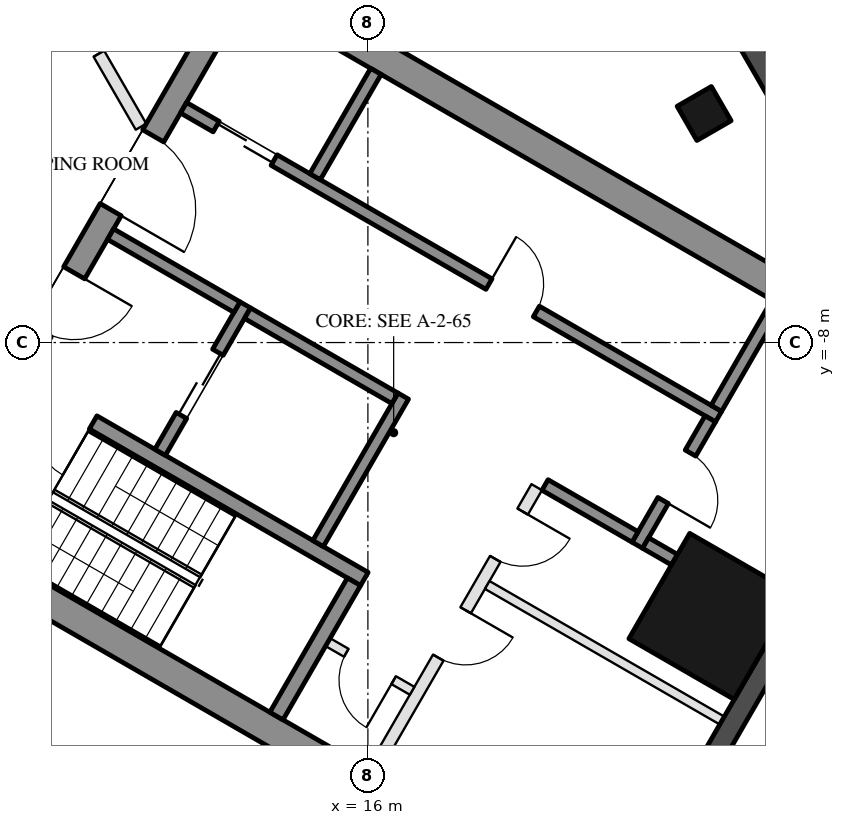
"""IFC4 building model, lengths in metres.
Left out: names, types, materials, properties, quantities, classifications, styles, units other than length and angle.
Written with IfcOpenShell. Run it as: python <this file> out.ifc"""

import sys

from ifc_helpers import new_model, si_unit, direction, frame, frame_2d, origin, origin_2d, place, context, subcontext, project, spatial, rectangle, hollow_rectangle, extrude, boolean, halfspace, element, fill, save


model = new_model("IFC4")
c1 = context("Model", 3, precision=1e-05, world=origin(), true_north=direction((0.0, 1.0)))
c2 = subcontext(c1, "Body", "Model", "MODEL_VIEW")
j1 = project(units=[si_unit("LENGTHUNIT", "METRE"), si_unit("PLANEANGLEUNIT", "RADIAN")], contexts=[c1])
p1 = place(None, origin())
s1 = spatial("IfcSite", under=j1, at=p1, CompositionType="ELEMENT")
p2 = place(p1, origin())
s2 = spatial("IfcBuilding", under=s1, at=p2, CompositionType="ELEMENT")
p3 = place(p2, frame((0.0, 0.0, 280.0)))
s3 = spatial("IfcBuildingStorey", under=s2, at=p3, CompositionType="ELEMENT", Elevation=280.0)
p4 = place(p3, frame((21.53, -4.233, 0.0), z_axis=(0.0, 0.0, 1.0), x_axis=(-0.5, 0.866025403784, 0.0)))
e1 = element("IfcColumn", 1, at=p4, inside=s3, PredefinedType="COLUMN", context=c2, shape_type="SweptSolid", body=[
    boolean("DIFFERENCE", extrude(hollow_rectangle(XDim=0.65, YDim=0.65, WallThickness=0.03, at=origin_2d()), origin(), (0.0, 0.0, 1.0), 3.7), halfspace(frame((0.0, 0.0, 0.047), z_axis=(0.0, 0.0, 1.0), x_axis=(1.0, 0.0, 0.0)), True)),
])
p5 = place(p3, frame((21.658, -12.504, 0.0), z_axis=(0.0, 0.0, 1.0), x_axis=(0.5, 0.866025403784, 0.0)))
e2 = element("IfcColumn", 2, at=p5, inside=s3, PredefinedType="COLUMN", context=c2, shape_type="SweptSolid", body=[
    boolean("DIFFERENCE", extrude(hollow_rectangle(XDim=2.0, YDim=2.0, WallThickness=0.05, at=origin_2d()), origin(), (0.0, 0.0, 1.0), 3.7), halfspace(frame((0.0, 0.0, 0.113), z_axis=(0.0, 0.0, 1.0), x_axis=(1.0, 0.0, 0.0)), True)),
])
p6 = place(p3, frame((21.384, -15.33, 0.0), z_axis=(0.0, 0.0, 1.0), x_axis=(0.500020983425, 0.866013288659, 0.0)))
e3 = element("IfcWall", 3, at=p6, inside=s3, PredefinedType="SOLIDWALL", context=c2, shape_type="SweptSolid", body=[
    extrude(rectangle(XDim=5.168, YDim=0.35, at=frame_2d((2.584, 0.0))), origin(), (0.0, 0.0, 1.0), 3.55),
])
p7 = place(p3, frame((23.968, -6.006, 0.0), z_axis=(0.0, 0.0, 1.0), x_axis=(-0.500008899612, 0.86602026553, 0.0)))
e4 = element("IfcWall", 4, at=p7, inside=s3, PredefinedType="SOLIDWALL", context=c2, shape_type="SweptSolid", body=[
    extrude(rectangle(XDim=10.87, YDim=0.35, at=frame_2d((5.435, 0.0))), origin(), (0.0, 0.0, 1.0), 3.55),
])
p8 = place(p7, frame((6.894, 0.0, 0.0)))
e5 = element("IfcOpeningElement", 5, at=p8, cuts=e4, PredefinedType="OPENING", context=c2, shape_type="SweptSolid", body=[
    extrude(rectangle(XDim=2.4, YDim=2.4, at=frame_2d((1.2, 1.2))), frame((0.0, 0.185, 0.0), z_axis=(0.0, -1.0, 0.0), x_axis=(1.0, 0.0, 0.0)), (0.0, 0.0, 1.0), 0.37),
])
p9 = place(p7, frame((3.429, 0.0, 0.3)))
e6 = element("IfcOpeningElement", 6, at=p9, cuts=e4, PredefinedType="OPENING", context=c2, shape_type="SweptSolid", body=[
    extrude(rectangle(XDim=3.1, YDim=2.65, at=frame_2d((1.55, 1.325))), frame((0.0, 0.185, 0.0), z_axis=(0.0, -1.0, 0.0), x_axis=(1.0, 0.0, 0.0)), (0.0, 0.0, 1.0), 0.37),
])
for number, where, z_axis, x_axis in (
    (7, (8.547, -10.997, 0.0), (0.0, 0.0, 1.0), (0.866, -0.5, 0.0)),
    (8, (13.797, -1.903, 0.0), (0.0, 0.0, 1.0), (0.866, -0.5, 0.0)),
):
    element("IfcWall", number, at=place(p3, frame(where, z_axis=z_axis, x_axis=x_axis)), inside=s3, PredefinedType="SHEAR", context=c2, shape_type="SweptSolid", body=[
        extrude(rectangle(XDim=12.129, YDim=0.5, at=frame_2d((6.064, 0.0))), origin(), (0.0, 0.0, 1.0), 3.5),
    ])
p10 = place(p3, frame((8.845, -10.88, 0.0), z_axis=(0.0, 0.0, 1.0), x_axis=(0.500004234368, 0.866022959057, 0.0)))
e9 = element("IfcWall", 9, at=p10, inside=s3, PredefinedType="SHEAR", context=c2, shape_type="SweptSolid", body=[
    extrude(rectangle(XDim=10.0, YDim=0.4, at=frame_2d((5.0, 0.0))), origin(), (0.0, 0.0, 1.0), 3.5),
])
p11 = place(p10, frame((3.55, 0.0, 0.0)))
e10 = element("IfcOpeningElement", 10, at=p11, cuts=e9, PredefinedType="OPENING", context=c2, shape_type="SweptSolid", body=[
    extrude(rectangle(XDim=1.1, YDim=2.1, at=frame_2d((0.55, 1.05))), frame((0.0, 0.21, 0.0), z_axis=(0.0, -1.0, 0.0), x_axis=(1.0, 0.0, 0.0)), (0.0, 0.0, 1.0), 0.42),
])
p12 = place(p10, frame((5.85, 0.0, 0.0)))
e11 = element("IfcOpeningElement", 11, at=p12, cuts=e9, PredefinedType="OPENING", context=c2, shape_type="SweptSolid", body=[
    extrude(rectangle(XDim=1.4, YDim=2.1, at=frame_2d((0.7, 1.05))), frame((0.0, 0.21, 0.0), z_axis=(0.0, -1.0, 0.0), x_axis=(1.0, 0.0, 0.0)), (0.0, 0.0, 1.0), 0.42),
])
p13 = place(p3, frame((10.356, -8.664, 0.0), z_axis=(0.0, 0.0, 1.0), x_axis=(0.866028629588, -0.499994412703, 0.0)))
e12 = element("IfcWall", 12, at=p13, inside=s3, PredefinedType="SHEAR", context=c2, shape_type="SweptSolid", body=[
    extrude(rectangle(XDim=6.45, YDim=0.25, at=frame_2d((3.225, 0.0))), origin(), (0.0, 0.0, 1.0), 3.5),
])
p14 = place(p13, frame((0.3, 0.0, 0.0)))
e13 = element("IfcOpeningElement", 13, at=p14, cuts=e12, PredefinedType="OPENING", context=c2, shape_type="SweptSolid", body=[
    extrude(rectangle(XDim=1.0, YDim=2.1, at=frame_2d((0.5, 1.05))), frame((0.0, 0.135, 0.0), z_axis=(0.0, -1.0, 0.0), x_axis=(1.0, 0.0, 0.0)), (0.0, 0.0, 1.0), 0.27),
])
p15 = place(p3, frame((14.496, -14.143, 0.0), z_axis=(0.0, 0.0, 1.0), x_axis=(0.500062241894, 0.865989465428, 0.0)))
e14 = element("IfcWall", 14, at=p15, inside=s3, PredefinedType="SHEAR", context=c2, shape_type="SweptSolid", body=[
    extrude(rectangle(XDim=2.55, YDim=0.25, at=frame_2d((1.275, 0.0))), origin(), (0.0, 0.0, 1.0), 3.5),
])
p16 = place(p3, frame((15.181, -11.305, 0.0), z_axis=(0.0, 0.0, 1.0), x_axis=(0.49994636267, 0.866056369097, 0.0)))
e15 = element("IfcWall", 15, at=p16, inside=s3, PredefinedType="SHEAR", context=c2, shape_type="SweptSolid", body=[
    extrude(rectangle(XDim=2.8, YDim=0.2, at=frame_2d((1.4, 0.0))), origin(), (0.0, 0.0, 1.0), 3.5),
])
p17 = place(p3, frame((12.583, -9.805, 0.0), z_axis=(0.0, 0.0, 1.0), x_axis=(0.49994636267, 0.866056369097, 0.0)))
e16 = element("IfcWall", 16, at=p17, inside=s3, PredefinedType="SHEAR", context=c2, shape_type="SweptSolid", body=[
    extrude(rectangle(XDim=2.8, YDim=0.2, at=frame_2d((1.4, 0.0))), origin(), (0.0, 0.0, 1.0), 3.5),
])
p18 = place(p17, frame((0.7, 0.0, 0.0)))
e17 = element("IfcOpeningElement", 17, at=p18, cuts=e16, PredefinedType="OPENING", context=c2, shape_type="SweptSolid", body=[
    extrude(rectangle(XDim=1.2, YDim=2.1, at=frame_2d((0.6, 1.05))), frame((0.0, 0.11, 0.0), z_axis=(0.0, -1.0, 0.0), x_axis=(1.0, 0.0, 0.0)), (0.0, 0.0, 1.0), 0.22),
])
p19 = place(p3, frame((11.768, -6.217, 0.0), z_axis=(0.0, 0.0, 1.0), x_axis=(0.866050077142, -0.499957262057, 0.0)))
e18 = element("IfcWall", 18, at=p19, inside=s3, PredefinedType="SHEAR", context=c2, shape_type="SweptSolid", body=[
    extrude(rectangle(XDim=2.4, YDim=0.2, at=frame_2d((1.2, 0.0))), origin(), (0.0, 0.0, 1.0), 3.5),
])
p20 = place(p3, frame((14.02, -7.517, 0.0), z_axis=(0.0, 0.0, 1.0), x_axis=(0.866034573852, -0.49998411664, 0.0)))
e19 = element("IfcWall", 19, at=p20, inside=s3, PredefinedType="SHEAR", context=c2, shape_type="SweptSolid", body=[
    extrude(rectangle(XDim=2.8, YDim=0.2, at=frame_2d((1.4, 0.0))), origin(), (0.0, 0.0, 1.0), 3.5),
])
p21 = place(p3, frame((12.968, -4.138, 0.0), z_axis=(0.0, 0.0, 1.0), x_axis=(0.866028328073, -0.49999493495, 0.0)))
e20 = element("IfcWall", 20, at=p21, inside=s3, PredefinedType="SHEAR", context=c2, shape_type="SweptSolid", body=[
    extrude(rectangle(XDim=10.16, YDim=0.2, at=frame_2d((5.08, 0.0))), origin(), (0.0, 0.0, 1.0), 3.5),
])
p22 = place(p21, frame((0.62, 0.0, 0.0)))
e21 = element("IfcOpeningElement", 21, at=p22, cuts=e20, PredefinedType="OPENING", context=c2, shape_type="SweptSolid", body=[
    extrude(rectangle(XDim=1.1, YDim=2.1, at=frame_2d((0.55, 1.05))), frame((0.0, 0.11, 0.0), z_axis=(0.0, -1.0, 0.0), x_axis=(1.0, 0.0, 0.0)), (0.0, 0.0, 1.0), 0.22),
])
p23 = place(p21, frame((5.8, 0.0, 0.0)))
e22 = element("IfcOpeningElement", 22, at=p23, cuts=e20, PredefinedType="OPENING", context=c2, shape_type="SweptSolid", body=[
    extrude(rectangle(XDim=0.9, YDim=2.1, at=frame_2d((0.45, 1.05))), frame((0.0, 0.11, 0.0), z_axis=(0.0, -1.0, 0.0), x_axis=(1.0, 0.0, 0.0)), (0.0, 0.0, 1.0), 0.22),
])
p24 = place(p3, frame((20.43, -11.333, 0.0), z_axis=(0.0, 0.0, 1.0), x_axis=(0.500001309137, 0.866024647952, 0.0)))
e23 = element("IfcWall", 23, at=p24, inside=s3, PredefinedType="SHEAR", context=c2, shape_type="SweptSolid", body=[
    extrude(rectangle(XDim=2.4, YDim=0.2, at=frame_2d((1.2, 0.0))), origin(), (0.0, 0.0, 1.0), 3.5),
])
p25 = place(p24, frame((0.85, 0.0, 0.0)))
e24 = element("IfcOpeningElement", 24, at=p25, cuts=e23, PredefinedType="OPENING", context=c2, shape_type="SweptSolid", body=[
    extrude(rectangle(XDim=0.9, YDim=2.1, at=frame_2d((0.45, 1.05))), frame((0.0, 0.11, 0.0), z_axis=(0.0, -1.0, 0.0), x_axis=(1.0, 0.0, 0.0)), (0.0, 0.0, 1.0), 0.22),
])
p26 = place(p3, frame((18.913, -10.342, 0.0), z_axis=(0.0, 0.0, 1.0), x_axis=(0.866038183914, -0.499977863513, 0.0)))
e25 = element("IfcWall", 25, at=p26, inside=s3, PredefinedType="SHEAR", context=c2, shape_type="SweptSolid", body=[
    extrude(rectangle(XDim=1.71, YDim=0.2, at=frame_2d((0.855, 0.0))), origin(), (0.0, 0.0, 1.0), 3.5),
])
for number, where, z_axis, x_axis in (
    (26, (15.131, -5.272, 0.0), (0.0, 0.0, 1.0), (0.5, 0.866, 0.0)),
    (27, (21.73, -9.082, 0.0), (0.0, 0.0, 1.0), (0.5, 0.866, 0.0)),
):
    element("IfcWall", number, at=place(p3, frame(where, z_axis=z_axis, x_axis=x_axis)), inside=s3, PredefinedType="SHEAR", context=c2, shape_type="SweptSolid", body=[
        extrude(rectangle(XDim=2.0, YDim=0.2, at=frame_2d((1.0, 0.0))), origin(), (0.0, 0.0, 1.0), 3.5),
    ])
p27 = place(p3, frame((20.567, -11.297, 0.0), z_axis=(0.0, 0.0, 1.0), x_axis=(0.866237429803, -0.49963258021, 0.0)))
e28 = element("IfcWall", 28, at=p27, inside=s3, PredefinedType="SHEAR", context=c2, shape_type="SweptSolid", body=[
    extrude(rectangle(XDim=0.549, YDim=0.2, at=frame_2d((0.274, 0.0))), origin(), (0.0, 0.0, 1.0), 3.5),
])
p28 = place(p3, frame((16.076, -15.055, 0.0), z_axis=(0.0, 0.0, 1.0), x_axis=(0.499995103361, 0.866028230842, 0.0)))
e29 = element("IfcWall", 29, at=p28, inside=s3, PredefinedType="PARTITIONING", context=c2, shape_type="SweptSolid", body=[
    extrude(rectangle(XDim=5.4, YDim=0.2, at=frame_2d((2.7, 0.0))), origin(), (0.0, 0.0, 1.0), 3.5),
])
p29 = place(p28, frame((2.163, 0.0, 0.0)))
e30 = element("IfcOpeningElement", 30, at=p29, cuts=e29, PredefinedType="OPENING", context=c2, shape_type="SweptSolid", body=[
    extrude(rectangle(XDim=0.9, YDim=2.1, at=frame_2d((0.45, 1.05))), frame((0.0, 0.11, 0.0), z_axis=(0.0, -1.0, 0.0), x_axis=(1.0, 0.0, 0.0)), (0.0, 0.0, 1.0), 0.22),
])
p30 = place(p28, frame((4.038, 0.0, 0.0)))
e31 = element("IfcOpeningElement", 31, at=p30, cuts=e29, PredefinedType="OPENING", context=c2, shape_type="SweptSolid", body=[
    extrude(rectangle(XDim=0.9, YDim=2.1, at=frame_2d((0.45, 1.05))), frame((0.0, 0.11, 0.0), z_axis=(0.0, -1.0, 0.0), x_axis=(1.0, 0.0, 0.0)), (0.0, 0.0, 1.0), 0.22),
])
p31 = place(p3, frame((15.342, -12.928, 0.0), z_axis=(0.0, 0.0, 1.0), x_axis=(0.865989903783, -0.500061482766, 0.0)))
e32 = element("IfcWall", 32, at=p31, inside=s3, PredefinedType="PARTITIONING", context=c2, shape_type="SweptSolid", body=[
    extrude(rectangle(XDim=1.6, YDim=0.15, at=frame_2d((0.8, 0.0))), origin(), (0.0, 0.0, 1.0), 3.5),
])
p32 = place(p31, frame((0.35, 0.0, 0.0)))
e33 = element("IfcOpeningElement", 33, at=p32, cuts=e32, PredefinedType="OPENING", context=c2, shape_type="SweptSolid", body=[
    extrude(rectangle(XDim=0.9, YDim=2.1, at=frame_2d((0.45, 1.05))), frame((0.0, 0.085, 0.0), z_axis=(0.0, -1.0, 0.0), x_axis=(1.0, 0.0, 0.0)), (0.0, 0.0, 1.0), 0.17),
])
p33 = place(p3, frame((17.963, -11.987, 0.0), z_axis=(0.0, 0.0, 1.0), x_axis=(0.866010510293, -0.500025795397, 0.0)))
e34 = element("IfcWall", 34, at=p33, inside=s3, PredefinedType="PARTITIONING", context=c2, shape_type="SweptSolid", body=[
    extrude(rectangle(XDim=4.459, YDim=0.15, at=frame_2d((2.229, 0.0))), origin(), (0.0, 0.0, 1.0), 3.5),
])
p34 = place(p3, frame((10.382, -1.182, 0.0), z_axis=(0.0, 0.0, 1.0), x_axis=(0.50002859319, -0.866008894869, 0.0)))
e35 = element("IfcWall", 35, at=p34, inside=s3, PredefinedType="PARTITIONING", context=c2, shape_type="SweptSolid", body=[
    extrude(rectangle(XDim=3.774, YDim=0.2, at=frame_2d((1.887, 0.0))), origin(), (0.0, 0.0, 1.0), 3.05),
])
p35 = place(p34, frame((1.387, 0.0, 0.0)))
e36 = element("IfcOpeningElement", 36, at=p35, cuts=e35, PredefinedType="OPENING", context=c2, shape_type="SweptSolid", body=[
    extrude(rectangle(XDim=1.0, YDim=2.1, at=frame_2d((0.5, 1.05))), frame((0.0, 0.11, 0.0), z_axis=(0.0, -1.0, 0.0), x_axis=(1.0, 0.0, 0.0)), (0.0, 0.0, 1.0), 0.22),
])
p36 = place(p18, origin())
e37 = element("IfcDoor", 37, at=p36, inside=s3, OperationType="DOUBLE_DOOR_SLIDING", PredefinedType="DOOR", context=c2, shape_type="SweptSolid", body=[
    extrude(rectangle(XDim=1.2, YDim=2.1, at=frame_2d((0.6, 1.05))), frame((0.0, 0.025, 0.0), z_axis=(0.0, -1.0, 0.0), x_axis=(1.0, 0.0, 0.0)), (0.0, 0.0, 1.0), 0.05),
])
fill(e17, e37)
p37 = place(p32, frame((0.9, 0.0, 0.0), z_axis=(0.0, 0.0, 1.0), x_axis=(-1.0, 0.0, 0.0)))
e38 = element("IfcDoor", 38, at=p37, inside=s3, OperationType="SINGLE_SWING_LEFT", PredefinedType="DOOR", context=c2, shape_type="SweptSolid", body=[
    extrude(rectangle(XDim=0.9, YDim=2.1, at=frame_2d((0.45, 1.05))), frame((0.0, 0.025, 0.0), z_axis=(0.0, -1.0, 0.0), x_axis=(1.0, 0.0, 0.0)), (0.0, 0.0, 1.0), 0.05),
])
fill(e33, e38)
p38 = place(p22, origin())
e39 = element("IfcDoor", 39, at=p38, inside=s3, OperationType="DOUBLE_DOOR_SLIDING", PredefinedType="DOOR", context=c2, shape_type="SweptSolid", body=[
    extrude(rectangle(XDim=1.1, YDim=2.1, at=frame_2d((0.55, 1.05))), frame((0.0, 0.025, 0.0), z_axis=(0.0, -1.0, 0.0), x_axis=(1.0, 0.0, 0.0)), (0.0, 0.0, 1.0), 0.05),
])
fill(e21, e39)
p39 = place(p23, origin())
e40 = element("IfcDoor", 40, at=p39, inside=s3, OperationType="SINGLE_SWING_LEFT", PredefinedType="DOOR", context=c2, shape_type="SweptSolid", body=[
    extrude(rectangle(XDim=0.9, YDim=2.1, at=frame_2d((0.45, 1.05))), frame((0.0, 0.025, 0.0), z_axis=(0.0, -1.0, 0.0), x_axis=(1.0, 0.0, 0.0)), (0.0, 0.0, 1.0), 0.05),
])
fill(e22, e40)
p40 = place(p25, frame((0.9, 0.0, 0.0), z_axis=(0.0, 0.0, 1.0), x_axis=(-1.0, 0.0, 0.0)))
e41 = element("IfcDoor", 41, at=p40, inside=s3, OperationType="SINGLE_SWING_RIGHT", PredefinedType="DOOR", context=c2, shape_type="SweptSolid", body=[
    extrude(rectangle(XDim=0.9, YDim=2.1, at=frame_2d((0.45, 1.05))), frame((0.0, 0.025, 0.0), z_axis=(0.0, -1.0, 0.0), x_axis=(1.0, 0.0, 0.0)), (0.0, 0.0, 1.0), 0.05),
])
fill(e24, e41)
p41 = place(p29, frame((0.9, 0.0, 0.0), z_axis=(0.0, 0.0, 1.0), x_axis=(-1.0, 0.0, 0.0)))
e42 = element("IfcDoor", 42, at=p41, inside=s3, OperationType="SINGLE_SWING_LEFT", PredefinedType="DOOR", context=c2, shape_type="SweptSolid", body=[
    extrude(rectangle(XDim=0.9, YDim=2.1, at=frame_2d((0.45, 1.05))), frame((0.0, 0.025, 0.0), z_axis=(0.0, -1.0, 0.0), x_axis=(1.0, 0.0, 0.0)), (0.0, 0.0, 1.0), 0.05),
])
fill(e30, e42)
p42 = place(p30, frame((0.9, 0.0, 0.0), z_axis=(0.0, 0.0, 1.0), x_axis=(-1.0, 0.0, 0.0)))
e43 = element("IfcDoor", 43, at=p42, inside=s3, OperationType="SINGLE_SWING_LEFT", PredefinedType="DOOR", context=c2, shape_type="SweptSolid", body=[
    extrude(rectangle(XDim=0.9, YDim=2.1, at=frame_2d((0.45, 1.05))), frame((0.0, 0.025, 0.0), z_axis=(0.0, -1.0, 0.0), x_axis=(1.0, 0.0, 0.0)), (0.0, 0.0, 1.0), 0.05),
])
fill(e31, e43)
p43 = place(p11, frame((1.1, 0.0, 0.0), z_axis=(0.0, 0.0, 1.0), x_axis=(-1.0, 0.0, 0.0)))
e44 = element("IfcDoor", 44, at=p43, inside=s3, OperationType="SINGLE_SWING_LEFT", PredefinedType="DOOR", context=c2, shape_type="SweptSolid", body=[
    extrude(rectangle(XDim=1.1, YDim=2.1, at=frame_2d((0.55, 1.05))), frame((0.0, 0.025, 0.0), z_axis=(0.0, -1.0, 0.0), x_axis=(1.0, 0.0, 0.0)), (0.0, 0.0, 1.0), 0.05),
])
fill(e10, e44)
p44 = place(p12, frame((1.4, 0.0, 0.0), z_axis=(0.0, 0.0, 1.0), x_axis=(-1.0, 0.0, 0.0)))
e45 = element("IfcDoor", 45, at=p44, inside=s3, OperationType="DOUBLE_DOOR_SINGLE_SWING", PredefinedType="DOOR", context=c2, shape_type="SweptSolid", body=[
    extrude(rectangle(XDim=1.4, YDim=2.1, at=frame_2d((0.7, 1.05))), frame((0.0, 0.025, 0.0), z_axis=(0.0, -1.0, 0.0), x_axis=(1.0, 0.0, 0.0)), (0.0, 0.0, 1.0), 0.05),
])
fill(e11, e45)
p45 = place(p14, frame((1.0, 0.0, 0.0), z_axis=(0.0, 0.0, 1.0), x_axis=(-1.0, 0.0, 0.0)))
e46 = element("IfcDoor", 46, at=p45, inside=s3, OperationType="SINGLE_SWING_LEFT", PredefinedType="DOOR", context=c2, shape_type="SweptSolid", body=[
    extrude(rectangle(XDim=1.0, YDim=2.1, at=frame_2d((0.5, 1.05))), frame((0.0, 0.025, 0.0), z_axis=(0.0, -1.0, 0.0), x_axis=(1.0, 0.0, 0.0)), (0.0, 0.0, 1.0), 0.05),
])
fill(e13, e46)
p46 = place(p35, origin())
e47 = element("IfcDoor", 47, at=p46, inside=s3, OperationType="SINGLE_SWING_LEFT", PredefinedType="DOOR", context=c2, shape_type="SweptSolid", body=[
    extrude(rectangle(XDim=1.0, YDim=2.1, at=frame_2d((0.5, 1.05))), frame((0.0, 0.025, 0.0), z_axis=(0.0, -1.0, 0.0), x_axis=(1.0, 0.0, 0.0)), (0.0, 0.0, 1.0), 0.05),
])
fill(e36, e47)
save(model, sys.argv[1])
